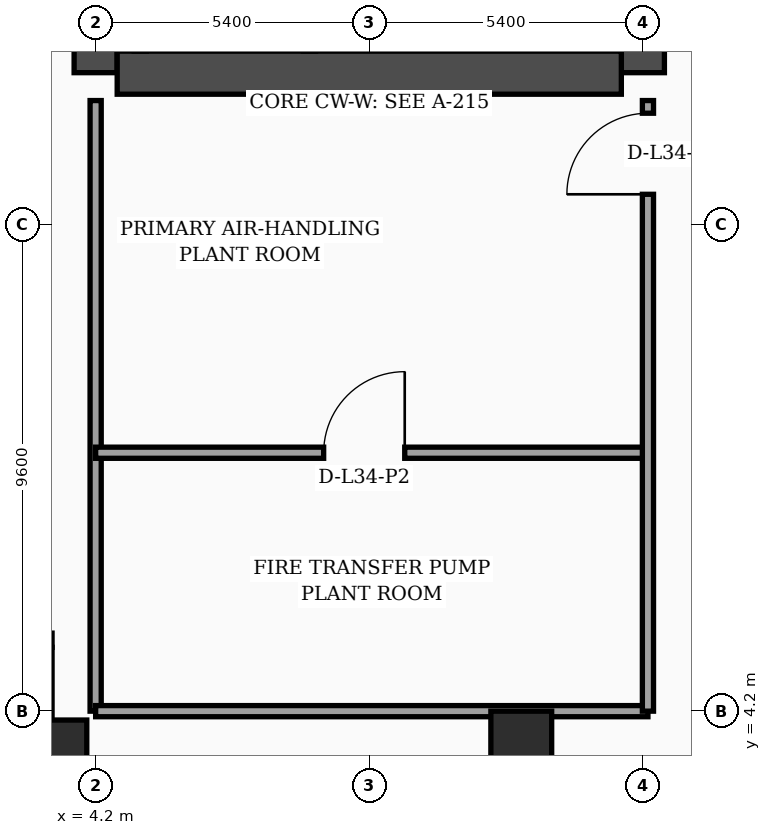
"""IFC4 building model, lengths in metres.
Left out: names, types, materials, properties, quantities, classifications, styles, units other than length and angle.
Written with IfcOpenShell. Run it as: python <this file> out.ifc"""

import sys

from ifc_helpers import new_model, si_unit, direction, frame, frame_2d, origin, origin_2d, place, context, subcontext, project, spatial, rectangle, hollow_rectangle, extrude, element, fill, save


model = new_model("IFC4")
c1 = context("Model", 3, precision=1e-05, world=origin(), true_north=direction((0.0, 1.0)))
c2 = subcontext(c1, "Body", "Model", "MODEL_VIEW")
j1 = project(units=[si_unit("LENGTHUNIT", "METRE"), si_unit("PLANEANGLEUNIT", "RADIAN")], contexts=[c1])
p1 = place(None, origin())
s1 = spatial("IfcSite", under=j1, at=p1, CompositionType="ELEMENT")
p2 = place(p1, origin())
s2 = spatial("IfcBuilding", under=s1, at=p2, CompositionType="ELEMENT")
p3 = place(p2, frame((0.0, 0.0, 139.2)))
s3 = spatial("IfcBuildingStorey", under=s2, at=p3, CompositionType="ELEMENT", Elevation=139.2)
p4 = place(p3, frame((4.2, 16.8, 0.0), z_axis=(0.0, 0.0, 1.0), x_axis=(0.0, 1.0, 0.0)))
e1 = element("IfcWall", 1, at=p4, inside=s3, PredefinedType="SHEAR", context=c2, shape_type="SweptSolid", body=[
    extrude(rectangle(XDim=21.6, YDim=0.85, at=frame_2d((10.8, 0.0))), origin(), (0.0, 0.0, 1.0), 4.56),
])
p5 = place(p3, frame((15.0, 16.8, 0.0), z_axis=(0.0, 0.0, 1.0), x_axis=(0.0, 1.0, 0.0)))
e2 = element("IfcWall", 2, at=p5, inside=s3, PredefinedType="SHEAR", context=c2, shape_type="SweptSolid", body=[
    extrude(rectangle(XDim=21.6, YDim=0.85, at=frame_2d((10.8, 0.0))), origin(), (0.0, 0.0, 1.0), 4.56),
])
p6 = place(p5, frame((8.65, 0.0, 0.0)))
e3 = element("IfcOpeningElement", 3, at=p6, cuts=e2, PredefinedType="OPENING", context=c2, shape_type="SweptSolid", body=[
    extrude(rectangle(XDim=1.1, YDim=2.2, at=frame_2d((0.55, 1.1))), frame((0.0, 0.435, 0.0), z_axis=(0.0, -1.0, 0.0), x_axis=(1.0, 0.0, 0.0)), (0.0, 0.0, 1.0), 0.87),
])
p7 = place(p5, frame((10.85, 0.0, 0.0)))
e4 = element("IfcOpeningElement", 4, at=p7, cuts=e2, PredefinedType="OPENING", context=c2, shape_type="SweptSolid", body=[
    extrude(rectangle(XDim=1.1, YDim=2.2, at=frame_2d((0.55, 1.1))), frame((0.0, 0.435, 0.0), z_axis=(0.0, -1.0, 0.0), x_axis=(1.0, 0.0, 0.0)), (0.0, 0.0, 1.0), 0.87),
])
p8 = place(p5, frame((13.5, 0.0, 0.0)))
e5 = element("IfcOpeningElement", 5, at=p8, cuts=e2, PredefinedType="OPENING", context=c2, shape_type="SweptSolid", body=[
    extrude(rectangle(XDim=1.1, YDim=2.2, at=frame_2d((0.55, 1.1))), frame((0.0, 0.435, 0.0), z_axis=(0.0, -1.0, 0.0), x_axis=(1.0, 0.0, 0.0)), (0.0, 0.0, 1.0), 0.87),
])
p9 = place(p5, frame((16.15, 0.0, 0.0)))
e6 = element("IfcOpeningElement", 6, at=p9, cuts=e2, PredefinedType="OPENING", context=c2, shape_type="SweptSolid", body=[
    extrude(rectangle(XDim=1.1, YDim=2.2, at=frame_2d((0.55, 1.1))), frame((0.0, 0.435, 0.0), z_axis=(0.0, -1.0, 0.0), x_axis=(1.0, 0.0, 0.0)), (0.0, 0.0, 1.0), 0.87),
])
p10 = place(p3, frame((4.625, 16.8, 0.0), z_axis=(0.0, 0.0, 1.0), x_axis=(1.0, 0.0, 0.0)))
e7 = element("IfcWall", 7, at=p10, inside=s3, PredefinedType="SHEAR", context=c2, shape_type="SweptSolid", body=[
    extrude(rectangle(XDim=9.95, YDim=0.85, at=frame_2d((4.975, 0.0))), origin(), (0.0, 0.0, 1.0), 4.56),
])
p11 = place(p3, frame((3.6, 3.6, 0.0), z_axis=(0.0, 0.0, 1.0), x_axis=(1.0, 0.0, 0.0)))
e8 = element("IfcColumn", 8, at=p11, inside=s3, PredefinedType="COLUMN", context=c2, shape_type="SweptSolid", body=[
    extrude(hollow_rectangle(XDim=0.85, YDim=0.85, WallThickness=0.036, at=origin_2d()), origin(), (0.0, 0.0, 1.0), 4.56),
])
p12 = place(p3, frame((12.6, 3.6, 0.0), z_axis=(0.0, 0.0, 1.0), x_axis=(1.0, 0.0, 0.0)))
e9 = element("IfcColumn", 9, at=p12, inside=s3, PredefinedType="COLUMN", context=c2, shape_type="SweptSolid", body=[
    extrude(rectangle(XDim=1.2, YDim=1.2, at=origin_2d()), origin(), (0.0, 0.0, 1.0), 4.56),
])
p13 = place(p3, frame((4.2, 4.2, 0.0), z_axis=(0.0, 0.0, 1.0), x_axis=(0.0, 1.0, 0.0)))
e10 = element("IfcWall", 10, at=p13, inside=s3, PredefinedType="SOLIDWALL", context=c2, shape_type="SweptSolid", body=[
    extrude(rectangle(XDim=12.05, YDim=0.22, at=frame_2d((6.025, 0.0))), origin(), (0.0, 0.0, 1.0), 3.84),
])
p14 = place(p3, frame((4.2, 4.2, 0.0), z_axis=(0.0, 0.0, 1.0), x_axis=(1.0, 0.0, 0.0)))
e11 = element("IfcWall", 11, at=p14, inside=s3, PredefinedType="SOLIDWALL", context=c2, shape_type="SweptSolid", body=[
    extrude(rectangle(XDim=10.9, YDim=0.22, at=frame_2d((5.45, 0.0))), origin(), (0.0, 0.0, 1.0), 3.84),
])
p15 = place(p3, frame((4.2, 9.3, 0.0), z_axis=(0.0, 0.0, 1.0), x_axis=(1.0, 0.0, 0.0)))
e12 = element("IfcWall", 12, at=p15, inside=s3, PredefinedType="SOLIDWALL", context=c2, shape_type="SweptSolid", body=[
    extrude(rectangle(XDim=10.9, YDim=0.22, at=frame_2d((5.45, 0.0))), origin(), (0.0, 0.0, 1.0), 3.84),
])
p16 = place(p15, frame((4.5, 0.0, 0.0)))
e13 = element("IfcOpeningElement", 13, at=p16, cuts=e12, PredefinedType="OPENING", context=c2, shape_type="SweptSolid", body=[
    extrude(rectangle(XDim=1.6, YDim=2.35, at=frame_2d((0.8, 1.175))), frame((0.0, 0.12, 0.0), z_axis=(0.0, -1.0, 0.0), x_axis=(1.0, 0.0, 0.0)), (0.0, 0.0, 1.0), 0.24),
])
p17 = place(p3, frame((15.1, 4.2, 0.0), z_axis=(0.0, 0.0, 1.0), x_axis=(0.0, 1.0, 0.0)))
e14 = element("IfcWall", 14, at=p17, inside=s3, PredefinedType="SOLIDWALL", context=c2, shape_type="SweptSolid", body=[
    extrude(rectangle(XDim=12.05, YDim=0.22, at=frame_2d((6.025, 0.0))), origin(), (0.0, 0.0, 1.0), 3.49),
])
p18 = place(p17, frame((10.2, 0.0, 0.0)))
e15 = element("IfcOpeningElement", 15, at=p18, cuts=e14, PredefinedType="OPENING", context=c2, shape_type="SweptSolid", body=[
    extrude(rectangle(XDim=1.6, YDim=2.35, at=frame_2d((0.8, 1.175))), frame((0.0, 0.12, 0.0), z_axis=(0.0, -1.0, 0.0), x_axis=(1.0, 0.0, 0.0)), (0.0, 0.0, 1.0), 0.24),
])
p19 = place(p16, origin())
e16 = element("IfcDoor", 16, at=p19, inside=s3, OperationType="SINGLE_SWING_RIGHT", PredefinedType="DOOR", context=c2, shape_type="SweptSolid", body=[
    extrude(rectangle(XDim=1.6, YDim=2.35, at=frame_2d((0.8, 1.175))), frame((0.0, 0.025, 0.0), z_axis=(0.0, -1.0, 0.0), x_axis=(1.0, 0.0, 0.0)), (0.0, 0.0, 1.0), 0.05),
])
fill(e13, e16)
p20 = place(p18, origin())
e17 = element("IfcDoor", 17, at=p20, inside=s3, OperationType="SINGLE_SWING_LEFT", PredefinedType="DOOR", context=c2, shape_type="SweptSolid", body=[
    extrude(rectangle(XDim=1.6, YDim=2.35, at=frame_2d((0.8, 1.175))), frame((0.0, 0.025, 0.0), z_axis=(0.0, -1.0, 0.0), x_axis=(1.0, 0.0, 0.0)), (0.0, 0.0, 1.0), 0.05),
])
fill(e15, e17)
save(model, sys.argv[1])
